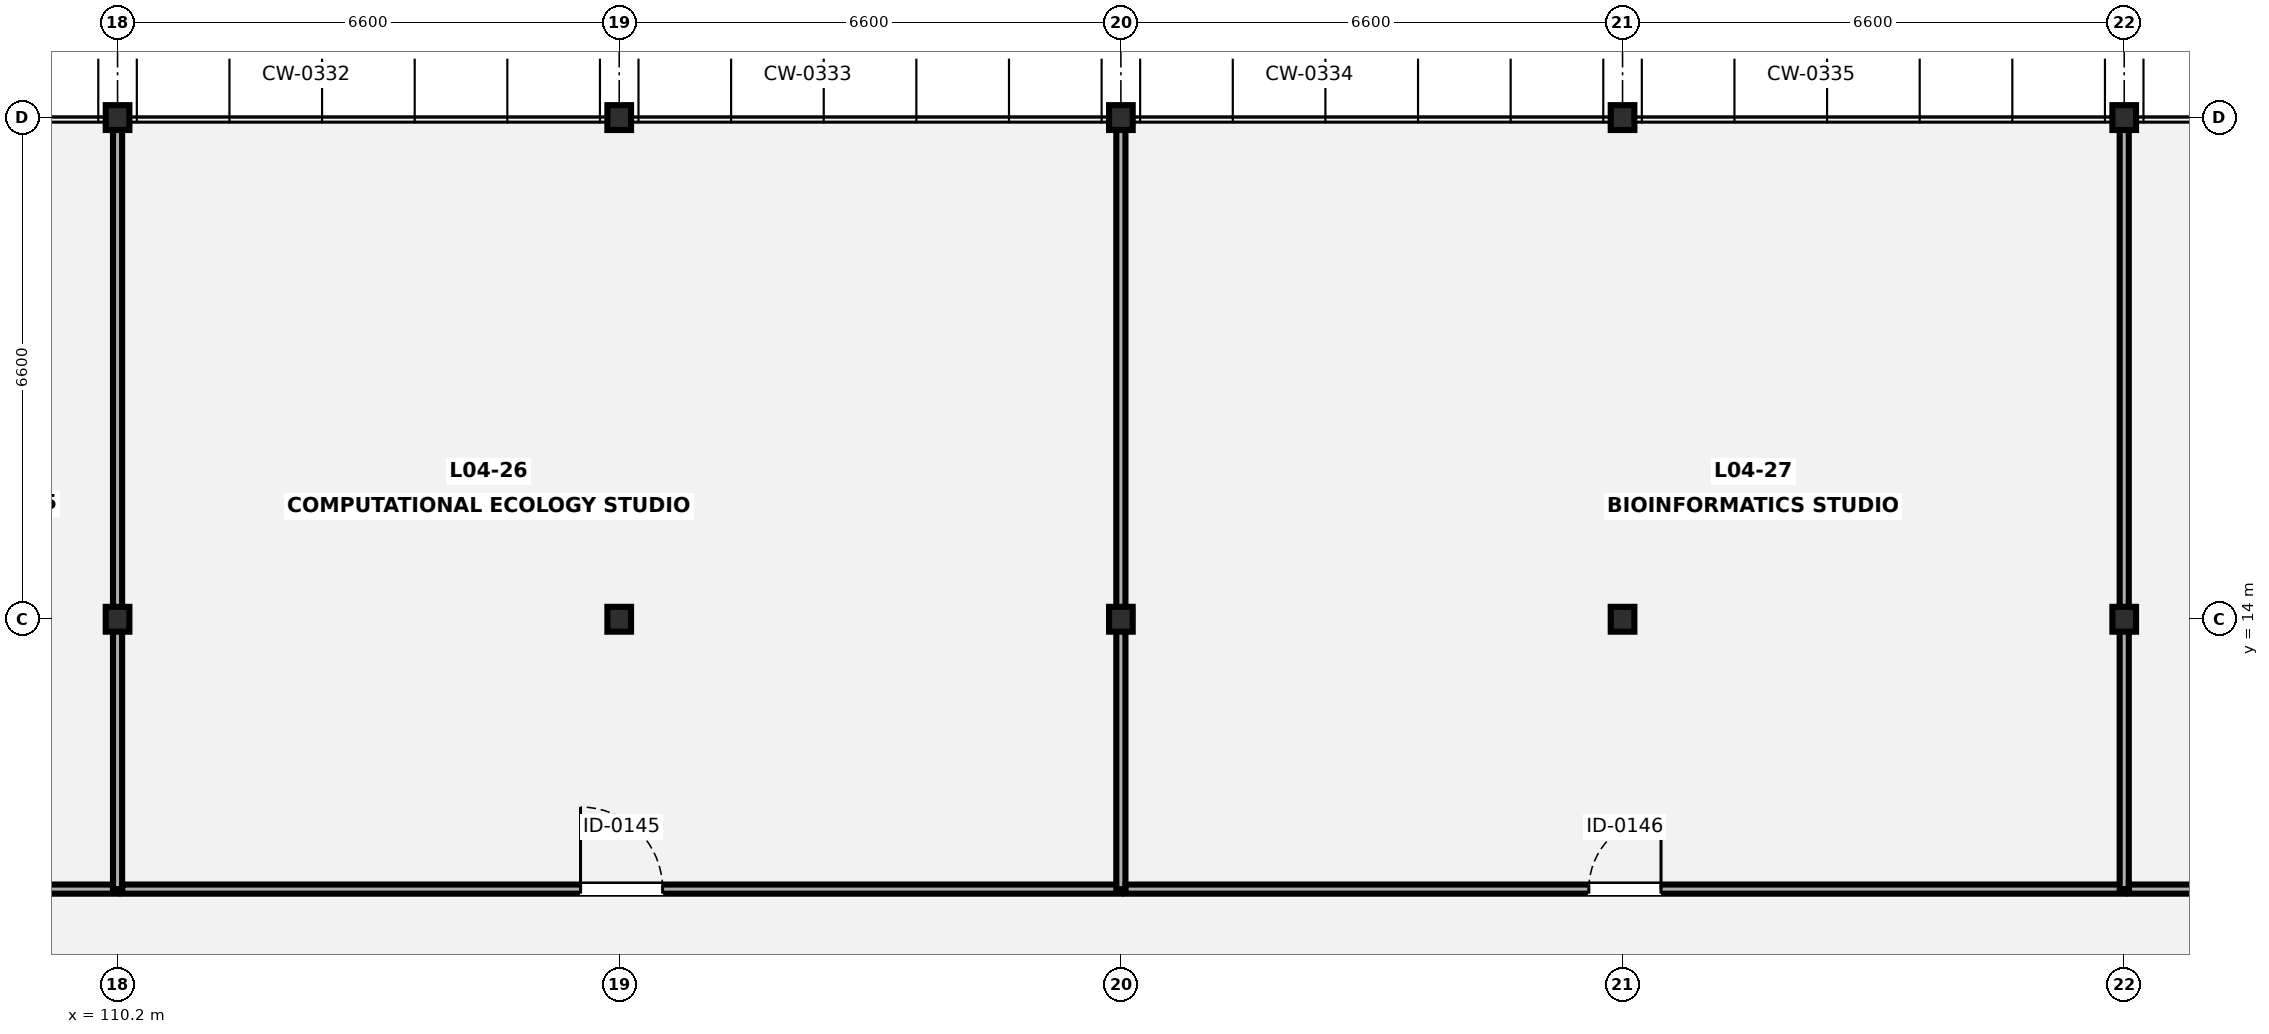
"""IFC4 building model, lengths in metres.
Left out: names, types, materials, properties, quantities, classifications, styles, units other than length and angle.
Written with IfcOpenShell. Run it as: python <this file> out.ifc"""

import sys

from ifc_helpers import new_model, si_unit, direction, frame, frame_2d, origin, origin_2d, place, context, subcontext, project, spatial, rectangle, i_section, extrude, element, fill, save


model = new_model("IFC4")
c1 = context("Model", 3, precision=1e-05, world=origin(), true_north=direction((0.0, 1.0)))
c2 = subcontext(c1, "Body", "Model", "MODEL_VIEW")
j1 = project(units=[si_unit("LENGTHUNIT", "METRE"), si_unit("PLANEANGLEUNIT", "RADIAN")], contexts=[c1])
p1 = place(None, origin())
s1 = spatial("IfcSite", under=j1, at=p1, CompositionType="ELEMENT")
p2 = place(p1, origin())
s2 = spatial("IfcBuilding", under=s1, at=p2, CompositionType="ELEMENT")
p3 = place(p2, frame((0.0, 0.0, 17.5)))
s3 = spatial("IfcBuildingStorey", under=s2, at=p3, CompositionType="ELEMENT", Elevation=17.5)
for number, where, z_axis, x_axis in (
    (1, (110.2, 14.0, 0.0), (0.0, 0.0, 1.0), (1.0, 0.0, 0.0)),
    (2, (110.2, 20.6, 0.0), (0.0, 0.0, 1.0), (1.0, 0.0, 0.0)),
    (3, (116.8, 14.0, 0.0), (0.0, 0.0, 1.0), (1.0, 0.0, 0.0)),
    (4, (116.8, 20.6, 0.0), (0.0, 0.0, 1.0), (1.0, 0.0, 0.0)),
    (5, (123.4, 14.0, 0.0), (0.0, 0.0, 1.0), (1.0, 0.0, 0.0)),
    (6, (123.4, 20.6, 0.0), (0.0, 0.0, 1.0), (1.0, 0.0, 0.0)),
    (7, (130.0, 14.0, 0.0), (0.0, 0.0, 1.0), (1.0, 0.0, 0.0)),
    (8, (130.0, 20.6, 0.0), (0.0, 0.0, 1.0), (1.0, 0.0, 0.0)),
    (9, (136.6, 14.0, 0.0), (0.0, 0.0, 1.0), (1.0, 0.0, 0.0)),
    (10, (136.6, 20.6, 0.0), (0.0, 0.0, 1.0), (1.0, 0.0, 0.0)),
):
    element("IfcColumn", number, at=place(p3, frame(where, z_axis=z_axis, x_axis=x_axis)), inside=s3, PredefinedType="COLUMN", context=c2, shape_type="SweptSolid", body=[
        extrude(i_section(OverallWidth=0.311, OverallDepth=0.327, WebThickness=0.016, FlangeThickness=0.025, FilletRadius=0.017, at=origin_2d()), origin(), (0.0, 0.0, 1.0), 4.2),
    ])
p4 = place(p3, frame((103.6, 10.45, 0.0), z_axis=(0.0, 0.0, 1.0), x_axis=(1.0, 0.0, 0.0)))
e11 = element("IfcWall", 11, at=p4, inside=s3, PredefinedType="PARTITIONING", context=c2, shape_type="SweptSolid", body=[
    extrude(rectangle(XDim=6.6, YDim=0.12, at=frame_2d((3.3, 0.0))), origin(), (0.0, 0.0, 1.0), 3.546),
])
p5 = place(p4, frame((2.825, 0.0, 0.0)))
e12 = element("IfcOpeningElement", 12, at=p5, cuts=e11, PredefinedType="OPENING", context=c2, shape_type="SweptSolid", body=[
    extrude(rectangle(XDim=0.95, YDim=2.1, at=frame_2d((0.475, 1.05))), frame((0.0, 0.07, 0.0), z_axis=(0.0, -1.0, 0.0), x_axis=(1.0, 0.0, 0.0)), (0.0, 0.0, 1.0), 0.14),
])
p6 = place(p3, frame((110.2, 10.45, 0.0), z_axis=(0.0, 0.0, 1.0), x_axis=(0.0, 1.0, 0.0)))
e13 = element("IfcWall", 13, at=p6, inside=s3, PredefinedType="PARTITIONING", context=c2, shape_type="SweptSolid", body=[
    extrude(rectangle(XDim=10.15, YDim=0.12, at=frame_2d((5.075, 0.0))), origin(), (0.0, 0.0, 1.0), 3.372),
])
p7 = place(p3, frame((110.262, 10.45, 0.0), z_axis=(0.0, 0.0, 1.0), x_axis=(1.0, 0.0, 0.0)))
e14 = element("IfcWall", 14, at=p7, inside=s3, PredefinedType="PARTITIONING", context=c2, shape_type="SweptSolid", body=[
    extrude(rectangle(XDim=13.138, YDim=0.12, at=frame_2d((6.569, 0.0))), origin(), (0.0, 0.0, 1.0), 3.546),
])
p8 = place(p7, frame((6.029, 0.0, 0.0)))
e15 = element("IfcOpeningElement", 15, at=p8, cuts=e14, PredefinedType="OPENING", context=c2, shape_type="SweptSolid", body=[
    extrude(rectangle(XDim=1.08, YDim=2.12, at=frame_2d((0.54, 1.06))), frame((0.0, 0.07, 0.0), z_axis=(0.0, -1.0, 0.0), x_axis=(1.0, 0.0, 0.0)), (0.0, 0.0, 1.0), 0.14),
])
p9 = place(p3, frame((123.4, 10.45, 0.0), z_axis=(0.0, 0.0, 1.0), x_axis=(0.0, 1.0, 0.0)))
e16 = element("IfcWall", 16, at=p9, inside=s3, PredefinedType="PARTITIONING", context=c2, shape_type="SweptSolid", body=[
    extrude(rectangle(XDim=10.15, YDim=0.12, at=frame_2d((5.075, 0.0))), origin(), (0.0, 0.0, 1.0), 3.372),
])
p10 = place(p3, frame((123.462, 10.45, 0.0), z_axis=(0.0, 0.0, 1.0), x_axis=(1.0, 0.0, 0.0)))
e17 = element("IfcWall", 17, at=p10, inside=s3, PredefinedType="PARTITIONING", context=c2, shape_type="SweptSolid", body=[
    extrude(rectangle(XDim=13.138, YDim=0.12, at=frame_2d((6.569, 0.0))), origin(), (0.0, 0.0, 1.0), 3.546),
])
p11 = place(p10, frame((6.094, 0.0, 0.0)))
e18 = element("IfcOpeningElement", 18, at=p11, cuts=e17, PredefinedType="OPENING", context=c2, shape_type="SweptSolid", body=[
    extrude(rectangle(XDim=0.95, YDim=2.1, at=frame_2d((0.475, 1.05))), frame((0.0, 0.07, 0.0), z_axis=(0.0, -1.0, 0.0), x_axis=(1.0, 0.0, 0.0)), (0.0, 0.0, 1.0), 0.14),
])
p12 = place(p3, frame((136.6, 10.45, 0.0), z_axis=(0.0, 0.0, 1.0), x_axis=(0.0, 1.0, 0.0)))
e19 = element("IfcWall", 19, at=p12, inside=s3, PredefinedType="PARTITIONING", context=c2, shape_type="SweptSolid", body=[
    extrude(rectangle(XDim=10.15, YDim=0.12, at=frame_2d((5.075, 0.0))), origin(), (0.0, 0.0, 1.0), 3.372),
])
p13 = place(p3, frame((136.662, 10.45, 0.0), z_axis=(0.0, 0.0, 1.0), x_axis=(1.0, 0.0, 0.0)))
e20 = element("IfcWall", 20, at=p13, inside=s3, PredefinedType="PARTITIONING", context=c2, shape_type="SweptSolid", body=[
    extrude(rectangle(XDim=6.338, YDim=0.12, at=frame_2d((3.169, 0.0))), origin(), (0.0, 0.0, 1.0), 3.546),
])
p14 = place(p13, frame((2.369, 0.0, 0.0)))
e21 = element("IfcOpeningElement", 21, at=p14, cuts=e20, PredefinedType="OPENING", context=c2, shape_type="SweptSolid", body=[
    extrude(rectangle(XDim=1.6, YDim=2.18, at=frame_2d((0.8, 1.09))), frame((0.0, 0.07, 0.0), z_axis=(0.0, -1.0, 0.0), x_axis=(1.0, 0.0, 0.0)), (0.0, 0.0, 1.0), 0.14),
])
p15 = place(p8, origin())
e22 = element("IfcDoor", 22, at=p15, inside=s3, OperationType="SINGLE_SWING_LEFT", PredefinedType="DOOR", context=c2, shape_type="SweptSolid", body=[
    extrude(rectangle(XDim=1.08, YDim=2.12, at=frame_2d((0.54, 1.06))), frame((0.0, 0.025, 0.0), z_axis=(0.0, -1.0, 0.0), x_axis=(1.0, 0.0, 0.0)), (0.0, 0.0, 1.0), 0.05),
])
fill(e15, e22)
p16 = place(p11, origin())
e23 = element("IfcDoor", 23, at=p16, inside=s3, OperationType="SINGLE_SWING_RIGHT", PredefinedType="DOOR", context=c2, shape_type="SweptSolid", body=[
    extrude(rectangle(XDim=0.95, YDim=2.1, at=frame_2d((0.475, 1.05))), frame((0.0, 0.025, 0.0), z_axis=(0.0, -1.0, 0.0), x_axis=(1.0, 0.0, 0.0)), (0.0, 0.0, 1.0), 0.05),
])
fill(e18, e23)
save(model, sys.argv[1])
